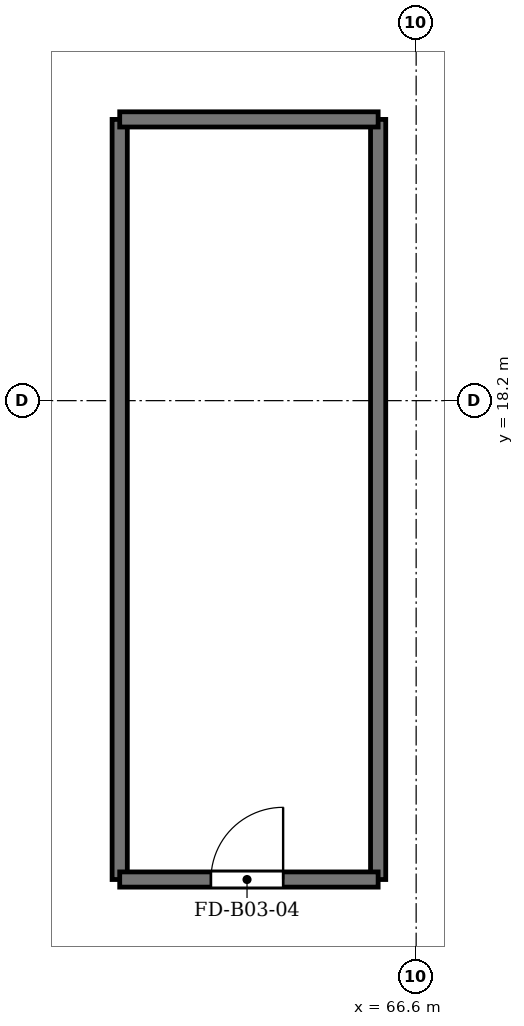
"""IFC4 building model, lengths in metres.
Left out: names, types, materials, properties, quantities, classifications, styles, units other than length and angle.
Written with IfcOpenShell. Run it as: python <this file> out.ifc"""

import sys

from ifc_helpers import new_model, si_unit, direction, frame, frame_2d, origin, place, context, subcontext, project, spatial, rectangle, extrude, source, transform, mapped, element, fill, save


model = new_model("IFC4")
c1 = context("Model", 3, precision=1e-05, world=origin(), true_north=direction((0.0, 1.0)))
c2 = subcontext(c1, "Body", "Model", "MODEL_VIEW")
j1 = project(units=[si_unit("LENGTHUNIT", "METRE"), si_unit("PLANEANGLEUNIT", "RADIAN")], contexts=[c1])
p1 = place(None, origin())
s1 = spatial("IfcSite", under=j1, at=p1, CompositionType="ELEMENT")
p2 = place(p1, origin())
s2 = spatial("IfcBuilding", under=s1, at=p2, CompositionType="ELEMENT")
p3 = place(p2, frame((0.0, 0.0, -13.2)))
s3 = spatial("IfcBuildingStorey", under=s2, at=p3, CompositionType="ELEMENT", Elevation=-13.2)
for number, where, z_axis, x_axis in (
    (1, (62.7, 11.9, 0.0), (0.0, 0.0, 1.0), (0.0, 1.0, 0.0)),
    (2, (66.1, 11.9, 0.0), (0.0, 0.0, 1.0), (0.0, 1.0, 0.0)),
):
    element("IfcWall", number, at=place(p3, frame(where, z_axis=z_axis, x_axis=x_axis)), inside=s3, PredefinedType="SHEAR", context=c2, shape_type="SweptSolid", body=[
        extrude(rectangle(XDim=10.0, YDim=0.2, at=frame_2d((5.0, 0.0))), origin(), (0.0, 0.0, 1.0), 4.28),
    ])
p4 = place(p3, frame((62.7, 11.9, 0.0), z_axis=(0.0, 0.0, 1.0), x_axis=(1.0, 0.0, 0.0)))
e3 = element("IfcWall", 3, at=p4, inside=s3, PredefinedType="SHEAR", context=c2, shape_type="SweptSolid", body=[
    extrude(rectangle(XDim=3.4, YDim=0.2, at=frame_2d((1.7, 0.0))), origin(), (0.0, 0.0, 1.0), 4.28),
])
p5 = place(p4, frame((1.2, 0.0, 0.0)))
e4 = element("IfcOpeningElement", 4, at=p5, cuts=e3, PredefinedType="OPENING", context=c2, shape_type="SweptSolid", body=[
    extrude(rectangle(XDim=0.95, YDim=2.15, at=frame_2d((0.475, 1.075))), frame((0.0, 0.11, 0.0), z_axis=(0.0, -1.0, 0.0), x_axis=(1.0, 0.0, 0.0)), (0.0, 0.0, 1.0), 0.22),
])
p6 = place(p3, frame((62.7, 21.9, 0.0), z_axis=(0.0, 0.0, 1.0), x_axis=(1.0, 0.0, 0.0)))
e5 = element("IfcWall", 5, at=p6, inside=s3, PredefinedType="SHEAR", context=c2, shape_type="SweptSolid", body=[
    extrude(rectangle(XDim=3.4, YDim=0.2, at=frame_2d((1.7, 0.0))), origin(), (0.0, 0.0, 1.0), 4.28),
])
m1 = source(origin(), c2, "Body", "SweptSolid", [
    extrude(rectangle(XDim=0.95, YDim=2.15, at=frame_2d((0.475, 1.075))), frame((0.0, 0.025, 0.0), z_axis=(0.0, -1.0, 0.0), x_axis=(1.0, 0.0, 0.0)), (0.0, 0.0, 1.0), 0.05),
])
p7 = place(p5, origin())
e6 = element("IfcDoor", 6, at=p7, inside=s3, OperationType="SINGLE_SWING_RIGHT", PredefinedType="DOOR", context=c2, shape_type="MappedRepresentation", body=[
    mapped(m1, transform((0.0, 0.0, 0.0), x_axis=(1.0, 0.0, 0.0), y_axis=(0.0, 1.0, 0.0), z_axis=(0.0, 0.0, 1.0), scale=1.0)),
])
fill(e4, e6)
save(model, sys.argv[1])
